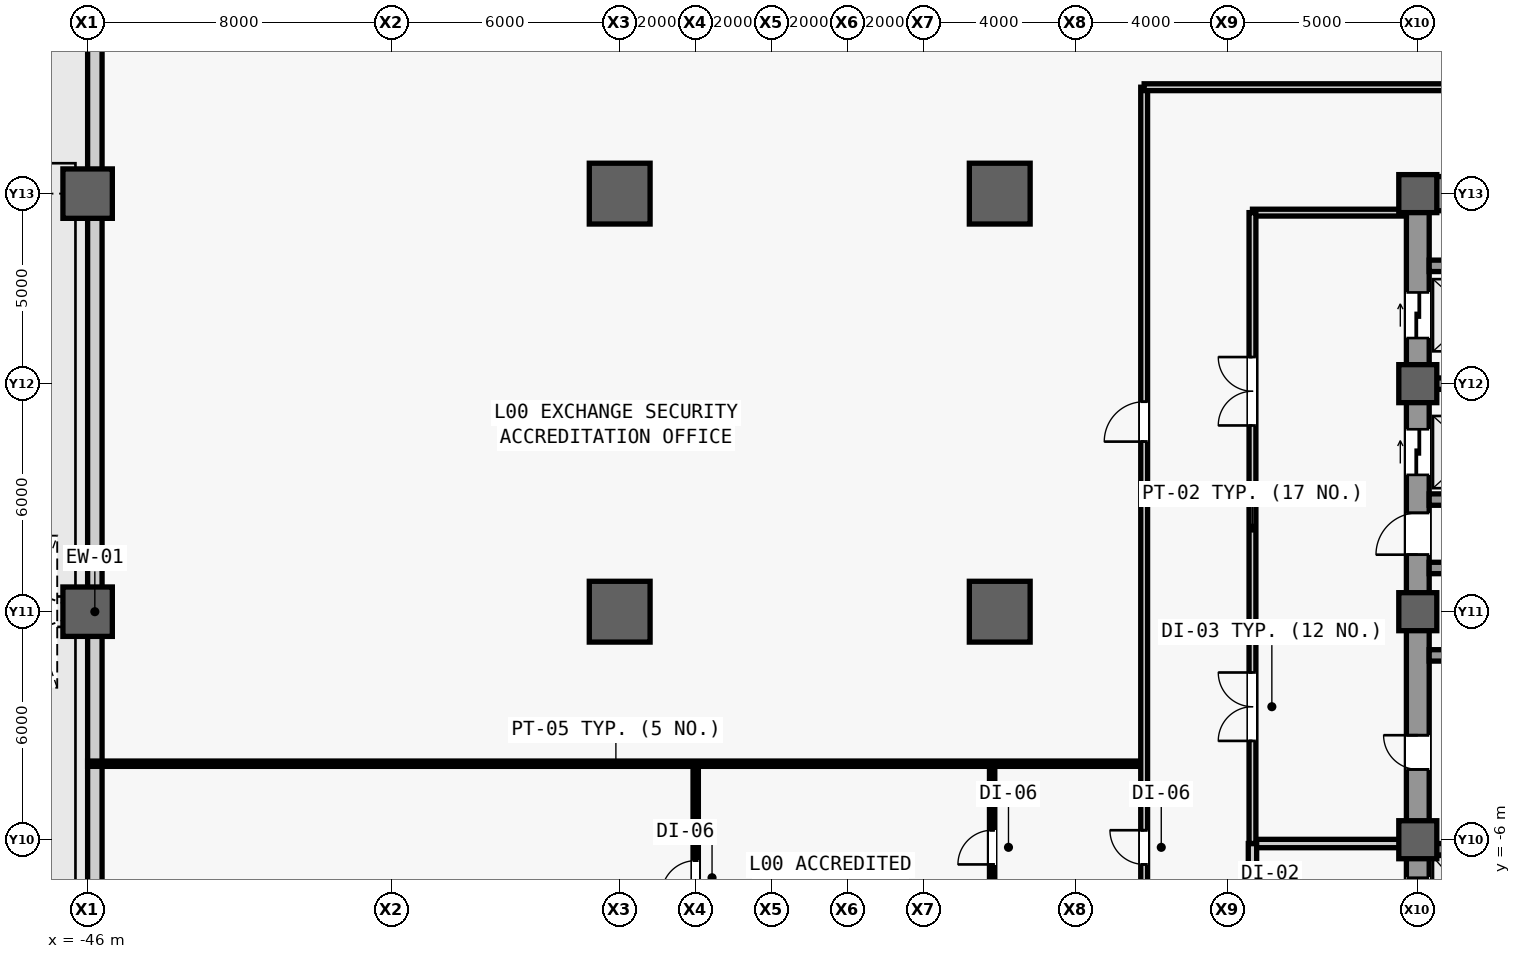
"""IFC4 building model, lengths in metres.
Left out: names, types, materials, properties, quantities, classifications, styles, units other than length and angle.
Written with IfcOpenShell. Run it as: python <this file> out.ifc"""

import sys

from ifc_helpers import new_model, si_unit, direction, frame, frame_2d, origin, origin_2d, place, context, subcontext, project, spatial, rectangle, extrude, source, transform, mapped, element, fill, save


model = new_model("IFC4")
c1 = context("Model", 3, precision=1e-05, world=origin(), true_north=direction((0.0, 1.0)))
c2 = subcontext(c1, "Body", "Model", "MODEL_VIEW")
j1 = project(units=[si_unit("LENGTHUNIT", "METRE"), si_unit("PLANEANGLEUNIT", "RADIAN")], contexts=[c1])
p1 = place(None, origin())
s1 = spatial("IfcSite", under=j1, at=p1, CompositionType="ELEMENT")
p2 = place(p1, origin())
s2 = spatial("IfcBuilding", under=s1, at=p2, CompositionType="ELEMENT")
p3 = place(p2, origin())
s3 = spatial("IfcBuildingStorey", under=s2, at=p3, CompositionType="ELEMENT", Elevation=0.0)
m1 = source(origin(), c2, "Body", "SweptSolid", [
    extrude(rectangle(XDim=22.0, YDim=0.6, at=frame_2d((11.0, 0.0))), origin(), (0.0, 0.0, 1.0), 6.28),
])
p4 = place(p3, frame((-11.0, -11.0, 0.0), z_axis=(0.0, 0.0, 1.0), x_axis=(0.0, 1.0, 0.0)))
e1 = element("IfcWall", 1, at=p4, inside=s3, PredefinedType="SHEAR", context=c2, shape_type="MappedRepresentation", body=[
    mapped(m1, transform((0.0, 0.0, 0.0), scale=1.0)),
])
m2 = source(origin(), c2, "Body", "SweptSolid", [
    extrude(rectangle(XDim=1.1, YDim=2.2, at=frame_2d((0.55, 1.1))), frame((0.0, 0.31, 0.0), z_axis=(0.0, -1.0, 0.0), x_axis=(1.0, 0.0, 0.0)), (0.0, 0.0, 1.0), 0.62),
])
p5 = place(p4, frame((0.8, 0.0, 0.0)))
e2 = element("IfcOpeningElement", 2, at=p5, cuts=e1, PredefinedType="OPENING", context=c2, shape_type="MappedRepresentation", body=[
    mapped(m2, transform((0.0, 0.0, 0.0), scale=1.0)),
])
p6 = place(p4, frame((12.5, 0.0, 0.0)))
e3 = element("IfcOpeningElement", 3, at=p6, cuts=e1, PredefinedType="OPENING", context=c2, shape_type="MappedRepresentation", body=[
    mapped(m2, transform((0.0, 0.0, 0.0), scale=1.0)),
])
m3 = source(origin(), c2, "Body", "SweptSolid", [
    extrude(rectangle(XDim=0.9, YDim=2.15, at=frame_2d((0.45, 1.075))), frame((0.0, 0.31, 0.0), z_axis=(0.0, -1.0, 0.0), x_axis=(1.0, 0.0, 0.0)), (0.0, 0.0, 1.0), 0.62),
])
p7 = place(p4, frame((6.85, 0.0, 0.0)))
e4 = element("IfcOpeningElement", 4, at=p7, cuts=e1, PredefinedType="OPENING", context=c2, shape_type="MappedRepresentation", body=[
    mapped(m3, transform((0.0, 0.0, 0.0), scale=1.0)),
])
m4 = source(origin(), c2, "Body", "SweptSolid", [
    extrude(rectangle(XDim=1.2, YDim=2.3, at=frame_2d((0.6, 1.15))), frame((0.0, 0.31, 0.0), z_axis=(0.0, -1.0, 0.0), x_axis=(1.0, 0.0, 0.0)), (0.0, 0.0, 1.0), 0.62),
])
p8 = place(p4, frame((14.6, 0.0, 0.0)))
e5 = element("IfcOpeningElement", 5, at=p8, cuts=e1, PredefinedType="OPENING", context=c2, shape_type="MappedRepresentation", body=[
    mapped(m4, transform((0.0, 0.0, 0.0), scale=1.0)),
])
p9 = place(p4, frame((18.2, 0.0, 0.0)))
e6 = element("IfcOpeningElement", 6, at=p9, cuts=e1, PredefinedType="OPENING", context=c2, shape_type="MappedRepresentation", body=[
    mapped(m4, transform((0.0, 0.0, 0.0), scale=1.0)),
])
m5 = source(origin(), c2, "Body", "SweptSolid", [
    extrude(rectangle(XDim=1.3, YDim=2.3, at=frame_2d((0.65, 1.15))), frame((0.0, 0.31, 0.0), z_axis=(0.0, -1.0, 0.0), x_axis=(1.0, 0.0, 0.0)), (0.0, 0.0, 1.0), 0.62),
])
p10 = place(p4, frame((2.7, 0.0, 0.0)))
e7 = element("IfcOpeningElement", 7, at=p10, cuts=e1, PredefinedType="OPENING", context=c2, shape_type="MappedRepresentation", body=[
    mapped(m5, transform((0.0, 0.0, 0.0), scale=1.0)),
])
m6 = source(origin(), c2, "Body", "SweptSolid", [
    extrude(rectangle(XDim=5.85, YDim=0.9, at=frame_2d((2.925, 0.0))), origin(), (0.0, 0.0, 1.0), 6.28),
])
p11 = place(p3, frame((-10.7, 11.0, 0.0), z_axis=(0.0, 0.0, 1.0), x_axis=(1.0, 0.0, 0.0)))
e8 = element("IfcWall", 8, at=p11, inside=s3, PredefinedType="SHEAR", context=c2, shape_type="MappedRepresentation", body=[
    mapped(m6, transform((0.0, 0.0, 0.0), scale=1.0)),
])
m7 = source(origin(), c2, "Body", "SweptSolid", [
    extrude(rectangle(XDim=5.6, YDim=0.3, at=frame_2d((2.8, 0.0))), origin(), (0.0, 0.0, 1.0), 6.28),
])
for number, where, z_axis, x_axis in (
    (9, (-10.7, -1.15, 0.0), (0.0, 0.0, 1.0), (1.0, 0.0, 0.0)),
    (10, (-10.7, 1.15, 0.0), (0.0, 0.0, 1.0), (1.0, 0.0, 0.0)),
):
    element("IfcWall", number, at=place(p3, frame(where, z_axis=z_axis, x_axis=x_axis)), inside=s3, PredefinedType="SHEAR", context=c2, shape_type="MappedRepresentation", body=[
        mapped(m7, transform((0.0, 0.0, 0.0), scale=1.0)),
    ])
m8 = source(origin(), c2, "Body", "SweptSolid", [
    extrude(rectangle(XDim=1.3, YDim=1.3, at=origin_2d()), origin(), (0.0, 0.0, 1.0), 6.6),
])
for number, where, z_axis, x_axis in (
    (11, (-46.0, 0.0, 0.0), (0.0, 0.0, 1.0), (1.0, 0.0, 0.0)),
    (12, (-46.0, 11.0, 0.0), (0.0, 0.0, 1.0), (1.0, 0.0, 0.0)),
):
    element("IfcColumn", number, at=place(p3, frame(where, z_axis=z_axis, x_axis=x_axis)), inside=s3, PredefinedType="COLUMN", context=c2, shape_type="MappedRepresentation", body=[
        mapped(m8, transform((0.0, 0.0, 0.0), scale=1.0)),
    ])
m9 = source(origin(), c2, "Body", "SweptSolid", [
    extrude(rectangle(XDim=1.6, YDim=1.6, at=origin_2d()), origin(), (0.0, 0.0, 1.0), 6.6),
])
for number, where, z_axis, x_axis in (
    (13, (-32.0, 0.0, 0.0), (0.0, 0.0, 1.0), (1.0, 0.0, 0.0)),
    (14, (-32.0, 11.0, 0.0), (0.0, 0.0, 1.0), (1.0, 0.0, 0.0)),
    (15, (-22.0, 0.0, 0.0), (0.0, 0.0, 1.0), (1.0, 0.0, 0.0)),
    (16, (-22.0, 11.0, 0.0), (0.0, 0.0, 1.0), (1.0, 0.0, 0.0)),
):
    element("IfcColumn", number, at=place(p3, frame(where, z_axis=z_axis, x_axis=x_axis)), inside=s3, PredefinedType="COLUMN", context=c2, shape_type="MappedRepresentation", body=[
        mapped(m9, transform((0.0, 0.0, 0.0), scale=1.0)),
    ])
m10 = source(origin(), c2, "Body", "SweptSolid", [
    extrude(rectangle(XDim=1.0, YDim=1.0, at=origin_2d()), origin(), (0.0, 0.0, 1.0), 6.6),
])
for number, where, z_axis, x_axis in (
    (17, (-11.0, -6.0, 0.0), (0.0, 0.0, 1.0), (1.0, 0.0, 0.0)),
    (18, (-11.0, 0.0, 0.0), (0.0, 0.0, 1.0), (1.0, 0.0, 0.0)),
    (19, (-11.0, 6.0, 0.0), (0.0, 0.0, 1.0), (1.0, 0.0, 0.0)),
    (20, (-11.0, 11.0, 0.0), (0.0, 0.0, 1.0), (1.0, 0.0, 0.0)),
):
    element("IfcColumn", number, at=place(p3, frame(where, z_axis=z_axis, x_axis=x_axis)), inside=s3, PredefinedType="COLUMN", context=c2, shape_type="MappedRepresentation", body=[
        mapped(m10, transform((0.0, 0.0, 0.0), scale=1.0)),
    ])
m11 = source(origin(), c2, "Body", "SweptSolid", [
    extrude(rectangle(XDim=75.1, YDim=0.38, at=frame_2d((37.55, 0.0))), origin(), (0.0, 0.0, 1.0), 4.48),
])
p12 = place(p3, frame((-45.81, -37.55, 0.0), z_axis=(0.0, 0.0, 1.0), x_axis=(0.0, 1.0, 0.0)))
e21 = element("IfcWall", 21, at=p12, inside=s3, PredefinedType="STANDARD", context=c2, shape_type="MappedRepresentation", body=[
    mapped(m11, transform((0.0, 0.0, 0.0), scale=1.0)),
])
m12 = source(origin(), c2, "Body", "SweptSolid", [
    extrude(rectangle(XDim=2.0, YDim=2.3, at=frame_2d((1.0, 1.15))), frame((0.0, 0.2, 0.0), z_axis=(0.0, -1.0, 0.0), x_axis=(1.0, 0.0, 0.0)), (0.0, 0.0, 1.0), 0.4),
])
p13 = place(p12, frame((9.55, 0.0, 0.0)))
e22 = element("IfcOpeningElement", 22, at=p13, cuts=e21, PredefinedType="OPENING", context=c2, shape_type="MappedRepresentation", body=[
    mapped(m12, transform((0.0, 0.0, 0.0), scale=1.0)),
])
m13 = source(origin(), c2, "Body", "SweptSolid", [
    extrude(rectangle(XDim=1.05, YDim=2.25, at=frame_2d((0.525, 1.125))), frame((0.0, 0.2, 0.0), z_axis=(0.0, -1.0, 0.0), x_axis=(1.0, 0.0, 0.0)), (0.0, 0.0, 1.0), 0.4),
])
p14 = place(p12, frame((16.35, 0.0, 0.0)))
e23 = element("IfcOpeningElement", 23, at=p14, cuts=e21, PredefinedType="OPENING", context=c2, shape_type="MappedRepresentation", body=[
    mapped(m13, transform((0.0, 0.0, 0.0), scale=1.0)),
])
m14 = source(origin(), c2, "Body", "SweptSolid", [
    extrude(rectangle(XDim=4.2, YDim=4.2, at=frame_2d((2.1, 2.1))), frame((0.0, 0.2, 0.0), z_axis=(0.0, -1.0, 0.0), x_axis=(1.0, 0.0, 0.0)), (0.0, 0.0, 1.0), 0.4),
])
p15 = place(p12, frame((64.45, 0.0, 0.0)))
e24 = element("IfcOpeningElement", 24, at=p15, cuts=e21, PredefinedType="OPENING", context=c2, shape_type="MappedRepresentation", body=[
    mapped(m14, transform((0.0, 0.0, 0.0), scale=1.0)),
])
m15 = source(origin(), c2, "Body", "SweptSolid", [
    extrude(rectangle(XDim=2.4, YDim=2.6, at=frame_2d((1.2, 1.3))), frame((0.0, 0.2, 0.0), z_axis=(0.0, -1.0, 0.0), x_axis=(1.0, 0.0, 0.0)), (0.0, 0.0, 1.0), 0.4),
])
p16 = place(p12, frame((55.125, 0.0, 0.7)))
e25 = element("IfcOpeningElement", 25, at=p16, cuts=e21, PredefinedType="OPENING", context=c2, shape_type="MappedRepresentation", body=[
    mapped(m15, transform((0.0, 0.0, 0.0), scale=1.0)),
])
m16 = source(origin(), c2, "Body", "SweptSolid", [
    extrude(rectangle(XDim=2.2, YDim=0.3, at=frame_2d((1.1, 0.0))), origin(), (0.0, 0.0, 1.0), 6.28),
])
for number, where, z_axis, x_axis in (
    (26, (-10.7, -6.25, 0.0), (0.0, 0.0, 1.0), (1.0, 0.0, 0.0)),
    (27, (-10.7, 2.95, 0.0), (0.0, 0.0, 1.0), (1.0, 0.0, 0.0)),
    (28, (-10.7, 6.0, 0.0), (0.0, 0.0, 1.0), (1.0, 0.0, 0.0)),
    (29, (-10.7, 9.1, 0.0), (0.0, 0.0, 1.0), (1.0, 0.0, 0.0)),
):
    element("IfcWall", number, at=place(p3, frame(where, z_axis=z_axis, x_axis=x_axis)), inside=s3, PredefinedType="SHEAR", context=c2, shape_type="MappedRepresentation", body=[
        mapped(m16, transform((0.0, 0.0, 0.0), scale=1.0)),
    ])
m17 = source(origin(), c2, "Body", "SweptSolid", [
    extrude(rectangle(XDim=4.05, YDim=0.22, at=frame_2d((2.025, 0.0))), origin(), (0.0, 0.0, 1.0), 6.28),
])
p17 = place(p3, frame((-15.35, -6.1, 0.0), z_axis=(0.0, 0.0, 1.0), x_axis=(1.0, 0.0, 0.0)))
e30 = element("IfcWall", 30, at=p17, inside=s3, PredefinedType="PARTITIONING", context=c2, shape_type="MappedRepresentation", body=[
    mapped(m17, transform((0.0, 0.0, 0.0), scale=1.0)),
])
m18 = source(origin(), c2, "Body", "SweptSolid", [
    extrude(rectangle(XDim=4.4, YDim=0.22, at=frame_2d((2.2, 0.0))), origin(), (0.0, 0.0, 1.0), 6.28),
])
p18 = place(p3, frame((-15.35, -10.5, 0.0), z_axis=(0.0, 0.0, 1.0), x_axis=(0.0, 1.0, 0.0)))
e31 = element("IfcWall", 31, at=p18, inside=s3, PredefinedType="PARTITIONING", context=c2, shape_type="MappedRepresentation", body=[
    mapped(m18, transform((0.0, 0.0, 0.0), scale=1.0)),
])
m19 = source(origin(), c2, "Body", "SweptSolid", [
    extrude(rectangle(XDim=1.2, YDim=2.2, at=frame_2d((0.6, 1.1))), frame((0.0, 0.12, 0.0), z_axis=(0.0, -1.0, 0.0), x_axis=(1.0, 0.0, 0.0)), (0.0, 0.0, 1.0), 0.24),
])
p19 = place(p18, frame((1.6, 0.0, 0.0)))
e32 = element("IfcOpeningElement", 32, at=p19, cuts=e31, PredefinedType="OPENING", context=c2, shape_type="MappedRepresentation", body=[
    mapped(m19, transform((0.0, 0.0, 0.0), scale=1.0)),
])
m20 = source(origin(), c2, "Body", "SweptSolid", [
    extrude(rectangle(XDim=4.05, YDim=0.18, at=frame_2d((2.025, 0.0))), origin(), (0.0, 0.0, 1.0), 6.28),
])
p20 = place(p3, frame((-15.35, 10.5, 0.0), z_axis=(0.0, 0.0, 1.0), x_axis=(1.0, 0.0, 0.0)))
e33 = element("IfcWall", 33, at=p20, inside=s3, PredefinedType="PARTITIONING", context=c2, shape_type="MappedRepresentation", body=[
    mapped(m20, transform((0.0, 0.0, 0.0), scale=1.0)),
])
m21 = source(origin(), c2, "Body", "SweptSolid", [
    extrude(rectangle(XDim=16.6, YDim=0.18, at=frame_2d((8.3, 0.0))), origin(), (0.0, 0.0, 1.0), 6.28),
])
p21 = place(p3, frame((-15.35, -6.1, 0.0), z_axis=(0.0, 0.0, 1.0), x_axis=(0.0, 1.0, 0.0)))
e34 = element("IfcWall", 34, at=p21, inside=s3, PredefinedType="PARTITIONING", context=c2, shape_type="MappedRepresentation", body=[
    mapped(m21, transform((0.0, 0.0, 0.0), scale=1.0)),
])
m22 = source(origin(), c2, "Body", "SweptSolid", [
    extrude(rectangle(XDim=1.8, YDim=2.25, at=frame_2d((0.9, 1.125))), frame((0.0, 0.1, 0.0), z_axis=(0.0, -1.0, 0.0), x_axis=(1.0, 0.0, 0.0)), (0.0, 0.0, 1.0), 0.2),
])
p22 = place(p21, frame((2.7, 0.0, 0.0)))
e35 = element("IfcOpeningElement", 35, at=p22, cuts=e34, PredefinedType="OPENING", context=c2, shape_type="MappedRepresentation", body=[
    mapped(m22, transform((0.0, 0.0, 0.0), scale=1.0)),
])
p23 = place(p21, frame((11.0, 0.0, 0.0)))
e36 = element("IfcOpeningElement", 36, at=p23, cuts=e34, PredefinedType="OPENING", context=c2, shape_type="MappedRepresentation", body=[
    mapped(m22, transform((0.0, 0.0, 0.0), scale=1.0)),
])
m23 = source(origin(), c2, "Body", "SweptSolid", [
    extrude(rectangle(XDim=27.8, YDim=0.14, at=frame_2d((13.9, 0.0))), origin(), (0.0, 0.0, 1.0), 6.28),
])
p24 = place(p3, frame((-46.0, -4.0, 0.0), z_axis=(0.0, 0.0, 1.0), x_axis=(1.0, 0.0, 0.0)))
e37 = element("IfcWall", 37, at=p24, inside=s3, PredefinedType="PARTITIONING", context=c2, shape_type="MappedRepresentation", body=[
    mapped(m23, transform((0.0, 0.0, 0.0), scale=1.0)),
])
m24 = source(origin(), c2, "Body", "SweptSolid", [
    extrude(rectangle(XDim=13.6, YDim=0.14, at=frame_2d((6.8, 0.0))), origin(), (0.0, 0.0, 1.0), 6.28),
])
p25 = place(p3, frame((-30.0, -17.6, 0.0), z_axis=(0.0, 0.0, 1.0), x_axis=(0.0, 1.0, 0.0)))
e38 = element("IfcWall", 38, at=p25, inside=s3, PredefinedType="PARTITIONING", context=c2, shape_type="MappedRepresentation", body=[
    mapped(m24, transform((0.0, 0.0, 0.0), scale=1.0)),
])
m25 = source(origin(), c2, "Body", "SweptSolid", [
    extrude(rectangle(XDim=0.9, YDim=2.15, at=frame_2d((0.45, 1.075))), frame((0.0, 0.08, 0.0), z_axis=(0.0, -1.0, 0.0), x_axis=(1.0, 0.0, 0.0)), (0.0, 0.0, 1.0), 0.16),
])
p26 = place(p25, frame((10.15, 0.0, 0.0)))
e39 = element("IfcOpeningElement", 39, at=p26, cuts=e38, PredefinedType="OPENING", context=c2, shape_type="MappedRepresentation", body=[
    mapped(m25, transform((0.0, 0.0, 0.0), scale=1.0)),
])
m26 = source(origin(), c2, "Body", "SweptSolid", [
    extrude(rectangle(XDim=6.0, YDim=0.14, at=frame_2d((3.0, 0.0))), origin(), (0.0, 0.0, 1.0), 4.48),
])
p27 = place(p3, frame((-22.2, -10.0, 0.0), z_axis=(0.0, 0.0, 1.0), x_axis=(0.0, 1.0, 0.0)))
e40 = element("IfcWall", 40, at=p27, inside=s3, PredefinedType="PARTITIONING", context=c2, shape_type="MappedRepresentation", body=[
    mapped(m26, transform((0.0, 0.0, 0.0), scale=1.0)),
])
p28 = place(p27, frame((3.35, 0.0, 0.0)))
e41 = element("IfcOpeningElement", 41, at=p28, cuts=e40, PredefinedType="OPENING", context=c2, shape_type="MappedRepresentation", body=[
    mapped(m25, transform((0.0, 0.0, 0.0), scale=1.0)),
])
m27 = source(origin(), c2, "Body", "SweptSolid", [
    extrude(rectangle(XDim=27.0, YDim=0.18, at=frame_2d((13.5, 0.0))), origin(), (0.0, 0.0, 1.0), 6.28),
])
p29 = place(p3, frame((-18.2, -13.2, 0.0), z_axis=(0.0, 0.0, 1.0), x_axis=(0.0, 1.0, 0.0)))
e42 = element("IfcWall", 42, at=p29, inside=s3, PredefinedType="PARTITIONING", context=c2, shape_type="MappedRepresentation", body=[
    mapped(m27, transform((0.0, 0.0, 0.0), scale=1.0)),
])
m28 = source(origin(), c2, "Body", "SweptSolid", [
    extrude(rectangle(XDim=0.9, YDim=2.15, at=frame_2d((0.45, 1.075))), frame((0.0, 0.1, 0.0), z_axis=(0.0, -1.0, 0.0), x_axis=(1.0, 0.0, 0.0)), (0.0, 0.0, 1.0), 0.2),
])
p30 = place(p29, frame((6.55, 0.0, 0.0)))
e43 = element("IfcOpeningElement", 43, at=p30, cuts=e42, PredefinedType="OPENING", context=c2, shape_type="MappedRepresentation", body=[
    mapped(m28, transform((0.0, 0.0, 0.0), scale=1.0)),
])
m29 = source(origin(), c2, "Body", "SweptSolid", [
    extrude(rectangle(XDim=1.05, YDim=2.2, at=frame_2d((0.525, 1.1))), frame((0.0, 0.1, 0.0), z_axis=(0.0, -1.0, 0.0), x_axis=(1.0, 0.0, 0.0)), (0.0, 0.0, 1.0), 0.2),
])
p31 = place(p29, frame((17.675, 0.0, 0.0)))
e44 = element("IfcOpeningElement", 44, at=p31, cuts=e42, PredefinedType="OPENING", context=c2, shape_type="MappedRepresentation", body=[
    mapped(m29, transform((0.0, 0.0, 0.0), scale=1.0)),
])
m30 = source(origin(), c2, "Body", "SweptSolid", [
    extrude(rectangle(XDim=36.4, YDim=0.18, at=frame_2d((18.2, 0.0))), origin(), (0.0, 0.0, 1.0), 6.28),
])
p32 = place(p3, frame((-18.2, 13.8, 0.0), z_axis=(0.0, 0.0, 1.0), x_axis=(1.0, 0.0, 0.0)))
e45 = element("IfcWall", 45, at=p32, inside=s3, PredefinedType="PARTITIONING", context=c2, shape_type="MappedRepresentation", body=[
    mapped(m30, transform((0.0, 0.0, 0.0), scale=1.0)),
])
p33 = place(p32, frame((17.3, 0.0, 0.0)))
e46 = element("IfcOpeningElement", 46, at=p33, cuts=e45, PredefinedType="OPENING", context=c2, shape_type="MappedRepresentation", body=[
    mapped(m22, transform((0.0, 0.0, 0.0), scale=1.0)),
])
m31 = source(origin(), c2, "Body", "SweptSolid", [
    extrude(rectangle(XDim=1.1, YDim=2.2, at=frame_2d((0.55, 1.1))), frame((0.0, 0.025, 0.0), z_axis=(0.0, -1.0, 0.0), x_axis=(1.0, 0.0, 0.0)), (0.0, 0.0, 1.0), 0.05),
])
p34 = place(p6, origin())
e47 = element("IfcDoor", 47, at=p34, inside=s3, OperationType="SINGLE_SWING_LEFT", PredefinedType="DOOR", context=c2, shape_type="MappedRepresentation", body=[
    mapped(m31, transform((0.0, 0.0, 0.0), scale=1.0)),
])
fill(e3, e47)
m32 = source(origin(), c2, "Body", "SweptSolid", [
    extrude(rectangle(XDim=0.9, YDim=2.15, at=frame_2d((0.45, 1.075))), frame((0.0, 0.025, 0.0), z_axis=(0.0, -1.0, 0.0), x_axis=(1.0, 0.0, 0.0)), (0.0, 0.0, 1.0), 0.05),
])
p35 = place(p7, origin())
e48 = element("IfcDoor", 48, at=p35, inside=s3, OperationType="SINGLE_SWING_RIGHT", PredefinedType="DOOR", context=c2, shape_type="MappedRepresentation", body=[
    mapped(m32, transform((0.0, 0.0, 0.0), scale=1.0)),
])
fill(e4, e48)
m33 = source(origin(), c2, "Body", "SweptSolid", [
    extrude(rectangle(XDim=1.8, YDim=2.25, at=frame_2d((0.9, 1.125))), frame((0.0, 0.025, 0.0), z_axis=(0.0, -1.0, 0.0), x_axis=(1.0, 0.0, 0.0)), (0.0, 0.0, 1.0), 0.05),
])
p36 = place(p22, origin())
e49 = element("IfcDoor", 49, at=p36, inside=s3, OperationType="SINGLE_SWING_LEFT", PredefinedType="DOOR", context=c2, shape_type="MappedRepresentation", body=[
    mapped(m33, transform((0.0, 0.0, 0.0), scale=1.0)),
])
fill(e35, e49)
p37 = place(p23, origin())
e50 = element("IfcDoor", 50, at=p37, inside=s3, OperationType="SINGLE_SWING_RIGHT", PredefinedType="DOOR", context=c2, shape_type="MappedRepresentation", body=[
    mapped(m33, transform((0.0, 0.0, 0.0), scale=1.0)),
])
fill(e36, e50)
p38 = place(p26, origin())
e51 = element("IfcDoor", 51, at=p38, inside=s3, OperationType="SINGLE_SWING_LEFT", PredefinedType="DOOR", context=c2, shape_type="MappedRepresentation", body=[
    mapped(m32, transform((0.0, 0.0, 0.0), scale=1.0)),
])
fill(e39, e51)
p39 = place(p28, origin())
e52 = element("IfcDoor", 52, at=p39, inside=s3, OperationType="SINGLE_SWING_LEFT", PredefinedType="DOOR", context=c2, shape_type="MappedRepresentation", body=[
    mapped(m32, transform((0.0, 0.0, 0.0), scale=1.0)),
])
fill(e41, e52)
p40 = place(p30, origin())
e53 = element("IfcDoor", 53, at=p40, inside=s3, OperationType="SINGLE_SWING_RIGHT", PredefinedType="DOOR", context=c2, shape_type="MappedRepresentation", body=[
    mapped(m32, transform((0.0, 0.0, 0.0), scale=1.0)),
])
fill(e43, e53)
m34 = source(origin(), c2, "Body", "SweptSolid", [
    extrude(rectangle(XDim=1.05, YDim=2.2, at=frame_2d((0.525, 1.1))), frame((0.0, 0.025, 0.0), z_axis=(0.0, -1.0, 0.0), x_axis=(1.0, 0.0, 0.0)), (0.0, 0.0, 1.0), 0.05),
])
p41 = place(p31, origin())
e54 = element("IfcDoor", 54, at=p41, inside=s3, OperationType="SINGLE_SWING_LEFT", PredefinedType="DOOR", context=c2, shape_type="MappedRepresentation", body=[
    mapped(m34, transform((0.0, 0.0, 0.0), scale=1.0)),
])
fill(e44, e54)
m35 = source(origin(), c2, "Body", "SweptSolid", [
    extrude(rectangle(XDim=1.2, YDim=2.3, at=frame_2d((0.6, 1.15))), frame((0.0, 0.025, 0.0), z_axis=(0.0, -1.0, 0.0), x_axis=(1.0, 0.0, 0.0)), (0.0, 0.0, 1.0), 0.05),
])
p42 = place(p8, origin())
e55 = element("IfcDoor", 55, at=p42, inside=s3, OperationType="SLIDING_TO_LEFT", PredefinedType="DOOR", context=c2, shape_type="MappedRepresentation", body=[
    mapped(m35, transform((0.0, 0.0, 0.0), scale=1.0)),
])
fill(e5, e55)
p43 = place(p9, origin())
e56 = element("IfcDoor", 56, at=p43, inside=s3, OperationType="SLIDING_TO_LEFT", PredefinedType="DOOR", context=c2, shape_type="MappedRepresentation", body=[
    mapped(m35, transform((0.0, 0.0, 0.0), scale=1.0)),
])
fill(e6, e56)
m36 = source(origin(), c2, "Body", "SweptSolid", [
    extrude(rectangle(XDim=1.3, YDim=2.3, at=frame_2d((0.65, 1.15))), frame((0.0, 0.025, 0.0), z_axis=(0.0, -1.0, 0.0), x_axis=(1.0, 0.0, 0.0)), (0.0, 0.0, 1.0), 0.05),
])
p44 = place(p10, origin())
e57 = element("IfcDoor", 57, at=p44, inside=s3, OperationType="SLIDING_TO_LEFT", PredefinedType="DOOR", context=c2, shape_type="MappedRepresentation", body=[
    mapped(m36, transform((0.0, 0.0, 0.0), scale=1.0)),
])
fill(e7, e57)
save(model, sys.argv[1])
